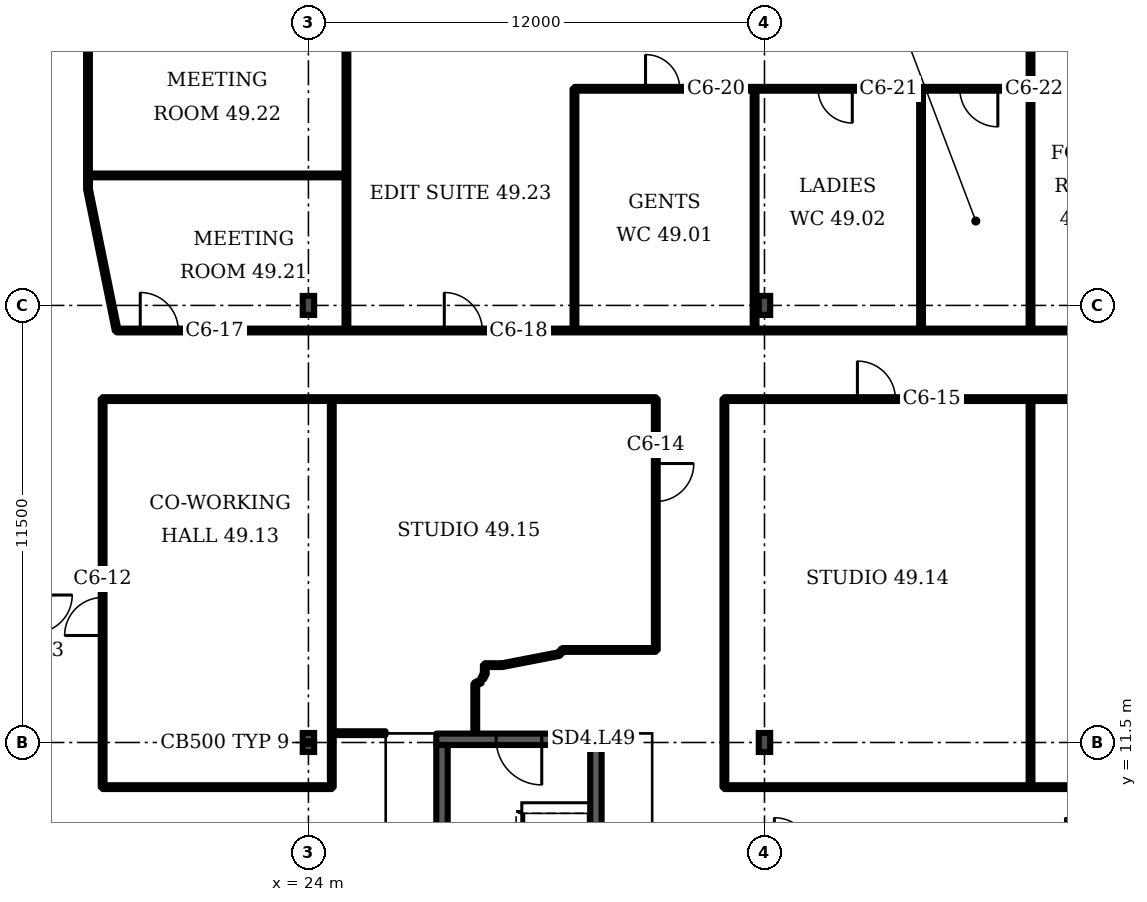
"""IFC4 building model, lengths in metres.
Left out: names, types, materials, properties, quantities, classifications, styles, units other than length and angle.
Written with IfcOpenShell. Run it as: python <this file> out.ifc"""

import sys

from ifc_helpers import new_model, si_unit, direction, frame, frame_2d, origin, origin_2d, place, context, subcontext, project, spatial, rectangle, i_section, extrude, element, fill, save


model = new_model("IFC4")
c1 = context("Model", 3, precision=1e-05, world=origin(), true_north=direction((0.0, 1.0)))
c2 = subcontext(c1, "Body", "Model", "MODEL_VIEW")
j1 = project(units=[si_unit("LENGTHUNIT", "METRE"), si_unit("PLANEANGLEUNIT", "RADIAN")], contexts=[c1])
p1 = place(None, origin())
s1 = spatial("IfcSite", under=j1, at=p1, CompositionType="ELEMENT")
p2 = place(p1, origin())
s2 = spatial("IfcBuilding", under=s1, at=p2, CompositionType="ELEMENT")
p3 = place(p2, frame((0.0, 0.0, 198.7)))
s3 = spatial("IfcBuildingStorey", under=s2, at=p3, CompositionType="ELEMENT", Elevation=198.7)
for number, where, z_axis, x_axis in (
    (1, (24.0, 11.5, 0.0), (0.0, 0.0, 1.0), (1.0, 0.0, 0.0)),
    (2, (36.0, 11.5, 0.0), (0.0, 0.0, 1.0), (1.0, 0.0, 0.0)),
    (3, (24.0, 23.0, 0.0), (0.0, 0.0, 1.0), (1.0, 0.0, 0.0)),
    (4, (36.0, 23.0, 0.0), (0.0, 0.0, 1.0), (1.0, 0.0, 0.0)),
):
    element("IfcColumn", number, at=place(p3, frame(where, z_axis=z_axis, x_axis=x_axis)), inside=s3, PredefinedType="COLUMN", context=c2, shape_type="SweptSolid", body=[
        extrude(i_section(OverallWidth=0.3, OverallDepth=0.5, WebThickness=0.014, FlangeThickness=0.028, FilletRadius=0.027, at=origin_2d()), origin(), (0.0, 0.0, 1.0), 3.6),
    ])
p4 = place(p3, frame((27.364, 11.584, 0.0), z_axis=(0.0, 0.0, 1.0), x_axis=(1.0, 0.0, 0.0)))
e5 = element("IfcWall", 5, at=p4, inside=s3, PredefinedType="SHEAR", context=c2, shape_type="SweptSolid", body=[
    extrude(rectangle(XDim=4.35, YDim=0.3, at=frame_2d((2.175, 0.0))), origin(), (0.0, 0.0, 1.0), 3.15),
])
p5 = place(p4, frame((1.575, 0.0, 0.0)))
e6 = element("IfcOpeningElement", 6, at=p5, cuts=e5, PredefinedType="OPENING", context=c2, shape_type="SweptSolid", body=[
    extrude(rectangle(XDim=1.2, YDim=2.1, at=frame_2d((0.6, 1.05))), frame((0.0, 0.16, 0.0), z_axis=(0.0, -1.0, 0.0), x_axis=(1.0, 0.0, 0.0)), (0.0, 0.0, 1.0), 0.32),
])
p6 = place(p3, frame((18.2, 26.06, 0.0), z_axis=(0.0, 0.0, 1.0), x_axis=(0.0, 1.0, 0.0)))
e7 = element("IfcWall", 7, at=p6, inside=s3, PredefinedType="PARTITIONING", context=c2, shape_type="SweptSolid", body=[
    extrude(rectangle(XDim=4.44, YDim=0.1, at=frame_2d((2.22, 0.0))), origin(), (0.0, 0.0, 1.0), 3.15),
])
p7 = place(p3, frame((18.2, 26.42, 0.0), z_axis=(0.0, 0.0, 1.0), x_axis=(1.0, 0.0, 0.0)))
e8 = element("IfcWall", 8, at=p7, inside=s3, PredefinedType="PARTITIONING", context=c2, shape_type="SweptSolid", body=[
    extrude(rectangle(XDim=6.8, YDim=0.1, at=frame_2d((3.4, 0.0))), origin(), (0.0, 0.0, 1.0), 3.15),
])
p8 = place(p3, frame((18.585, 10.325, 0.0), z_axis=(0.0, 0.0, 1.0), x_axis=(0.0, 1.0, 0.0)))
e9 = element("IfcWall", 9, at=p8, inside=s3, PredefinedType="PARTITIONING", context=c2, shape_type="SweptSolid", body=[
    extrude(rectangle(XDim=10.21, YDim=0.1, at=frame_2d((5.105, 0.0))), origin(), (0.0, 0.0, 1.0), 3.15),
])
p9 = place(p8, frame((3.99, 0.0, 0.0)))
e10 = element("IfcOpeningElement", 10, at=p9, cuts=e9, PredefinedType="OPENING", context=c2, shape_type="SweptSolid", body=[
    extrude(rectangle(XDim=1.0, YDim=2.1, at=frame_2d((0.5, 1.05))), frame((0.0, 0.06, 0.0), z_axis=(0.0, -1.0, 0.0), x_axis=(1.0, 0.0, 0.0)), (0.0, 0.0, 1.0), 0.12),
])
p10 = place(p3, frame((18.585, 10.325, 0.0), z_axis=(0.0, 0.0, 1.0), x_axis=(1.0, 0.0, 0.0)))
e11 = element("IfcWall", 11, at=p10, inside=s3, PredefinedType="PARTITIONING", context=c2, shape_type="SweptSolid", body=[
    extrude(rectangle(XDim=6.03, YDim=0.1, at=frame_2d((3.015, 0.0))), origin(), (0.0, 0.0, 1.0), 3.15),
])
p11 = place(p3, frame((18.585, 20.535, 0.0), z_axis=(0.0, 0.0, 1.0), x_axis=(1.0, 0.0, 0.0)))
e12 = element("IfcWall", 12, at=p11, inside=s3, PredefinedType="PARTITIONING", context=c2, shape_type="SweptSolid", body=[
    extrude(rectangle(XDim=14.555, YDim=0.1, at=frame_2d((7.277, 0.0))), origin(), (0.0, 0.0, 1.0), 3.15),
])
p12 = place(p3, frame((18.955, 22.34, 0.0), z_axis=(0.0, 0.0, 1.0), x_axis=(-0.198935, 0.980011, 0.0)))
e13 = element("IfcWall", 13, at=p12, inside=s3, PredefinedType="PARTITIONING", context=c2, shape_type="SweptSolid", body=[
    extrude(rectangle(XDim=3.796, YDim=0.1, at=frame_2d((1.898, 0.0))), origin(), (0.0, 0.0, 1.0), 3.15),
])
p13 = place(p3, frame((18.955, 22.34, 0.0), z_axis=(0.0, 0.0, 1.0), x_axis=(1.0, 0.0, 0.0)))
e14 = element("IfcWall", 14, at=p13, inside=s3, PredefinedType="PARTITIONING", context=c2, shape_type="SweptSolid", body=[
    extrude(rectangle(XDim=42.555, YDim=0.1, at=frame_2d((21.277, 0.0))), origin(), (0.0, 0.0, 1.0), 3.15),
])
p14 = place(p13, frame((0.62, 0.0, 0.0)))
e15 = element("IfcOpeningElement", 15, at=p14, cuts=e14, PredefinedType="OPENING", context=c2, shape_type="SweptSolid", body=[
    extrude(rectangle(XDim=1.0, YDim=2.1, at=frame_2d((0.5, 1.05))), frame((0.0, 0.06, 0.0), z_axis=(0.0, -1.0, 0.0), x_axis=(1.0, 0.0, 0.0)), (0.0, 0.0, 1.0), 0.12),
])
p15 = place(p13, frame((8.62, 0.0, 0.0)))
e16 = element("IfcOpeningElement", 16, at=p15, cuts=e14, PredefinedType="OPENING", context=c2, shape_type="SweptSolid", body=[
    extrude(rectangle(XDim=1.0, YDim=2.1, at=frame_2d((0.5, 1.05))), frame((0.0, 0.06, 0.0), z_axis=(0.0, -1.0, 0.0), x_axis=(1.0, 0.0, 0.0)), (0.0, 0.0, 1.0), 0.12),
])
p16 = place(p3, frame((24.615, 10.325, 0.0), z_axis=(0.0, 0.0, 1.0), x_axis=(0.0, 1.0, 0.0)))
e17 = element("IfcWall", 17, at=p16, inside=s3, PredefinedType="PARTITIONING", context=c2, shape_type="SweptSolid", body=[
    extrude(rectangle(XDim=10.21, YDim=0.1, at=frame_2d((5.105, 0.0))), origin(), (0.0, 0.0, 1.0), 3.15),
])
p17 = place(p3, frame((24.62, 11.745, 0.0), z_axis=(0.0, 0.0, 1.0), x_axis=(1.0, 0.0, 0.0)))
e18 = element("IfcWall", 18, at=p17, inside=s3, PredefinedType="PARTITIONING", context=c2, shape_type="SweptSolid", body=[
    extrude(rectangle(XDim=1.407, YDim=0.1, at=frame_2d((0.703, 0.0))), origin(), (0.0, 0.0, 1.0), 3.15),
])
p18 = place(p3, frame((25.0, 22.34, 0.0), z_axis=(0.0, 0.0, 1.0), x_axis=(0.0, 1.0, 0.0)))
e19 = element("IfcWall", 19, at=p18, inside=s3, PredefinedType="PARTITIONING", context=c2, shape_type="SweptSolid", body=[
    extrude(rectangle(XDim=8.16, YDim=0.1, at=frame_2d((4.08, 0.0))), origin(), (0.0, 0.0, 1.0), 3.15),
])
p19 = place(p3, frame((28.39, 13.035, 0.0), z_axis=(0.0, 0.0, 1.0), x_axis=(0.900411, 0.435047, 0.0)))
e20 = element("IfcWall", 20, at=p19, inside=s3, PredefinedType="PARTITIONING", context=c2, shape_type="SweptSolid", body=[
    extrude(rectangle(XDim=0.161, YDim=0.1, at=frame_2d((0.081, 0.0))), origin(), (0.0, 0.0, 1.0), 3.15),
])
p20 = place(p3, frame((28.39, 11.754, 0.0), z_axis=(0.0, 0.0, 1.0), x_axis=(0.0, 1.0, 0.0)))
e21 = element("IfcWall", 21, at=p20, inside=s3, PredefinedType="PARTITIONING", context=c2, shape_type="SweptSolid", body=[
    extrude(rectangle(XDim=1.281, YDim=0.1, at=frame_2d((0.64, 0.0))), origin(), (0.0, 0.0, 1.0), 3.15),
])
p21 = place(p3, frame((28.575, 13.185, 0.0), z_axis=(0.0, 0.0, 1.0), x_axis=(0.461027, 0.88739, 0.0)))
e22 = element("IfcWall", 22, at=p21, inside=s3, PredefinedType="PARTITIONING", context=c2, shape_type="SweptSolid", body=[
    extrude(rectangle(XDim=0.141, YDim=0.1, at=frame_2d((0.07, 0.0))), origin(), (0.0, 0.0, 1.0), 3.15),
])
p22 = place(p3, frame((28.64, 13.31, 0.0), z_axis=(0.0, 0.0, 1.0), x_axis=(0.0, 1.0, 0.0)))
e23 = element("IfcWall", 23, at=p22, inside=s3, PredefinedType="PARTITIONING", context=c2, shape_type="SweptSolid", body=[
    extrude(rectangle(XDim=0.225, YDim=0.1, at=frame_2d((0.112, 0.0))), origin(), (0.0, 0.0, 1.0), 3.15),
])
p23 = place(p3, frame((28.64, 13.535, 0.0), z_axis=(0.0, 0.0, 1.0), x_axis=(1.0, 0.0, 0.0)))
e24 = element("IfcWall", 24, at=p23, inside=s3, PredefinedType="PARTITIONING", context=c2, shape_type="SweptSolid", body=[
    extrude(rectangle(XDim=0.46, YDim=0.1, at=frame_2d((0.23, 0.0))), origin(), (0.0, 0.0, 1.0), 3.15),
])
p24 = place(p3, frame((29.1, 13.535, 0.0), z_axis=(0.0, 0.0, 1.0), x_axis=(0.981576, 0.191072, 0.0)))
e25 = element("IfcWall", 25, at=p24, inside=s3, PredefinedType="PARTITIONING", context=c2, shape_type="SweptSolid", body=[
    extrude(rectangle(XDim=1.518, YDim=0.1, at=frame_2d((0.759, 0.0))), origin(), (0.0, 0.0, 1.0), 3.15),
])
p25 = place(p3, frame((30.59, 13.825, 0.0), z_axis=(0.0, 0.0, 1.0), x_axis=(0.671773, 0.740757, 0.0)))
e26 = element("IfcWall", 26, at=p25, inside=s3, PredefinedType="PARTITIONING", context=c2, shape_type="SweptSolid", body=[
    extrude(rectangle(XDim=0.149, YDim=0.1, at=frame_2d((0.074, 0.0))), origin(), (0.0, 0.0, 1.0), 3.15),
])
p26 = place(p3, frame((30.69, 13.935, 0.0), z_axis=(0.0, 0.0, 1.0), x_axis=(1.0, 0.0, 0.0)))
e27 = element("IfcWall", 27, at=p26, inside=s3, PredefinedType="PARTITIONING", context=c2, shape_type="SweptSolid", body=[
    extrude(rectangle(XDim=2.45, YDim=0.1, at=frame_2d((1.225, 0.0))), origin(), (0.0, 0.0, 1.0), 3.15),
])
p27 = place(p3, frame((31.0, 22.34, 0.0), z_axis=(0.0, 0.0, 1.0), x_axis=(0.0, 1.0, 0.0)))
e28 = element("IfcWall", 28, at=p27, inside=s3, PredefinedType="PARTITIONING", context=c2, shape_type="SweptSolid", body=[
    extrude(rectangle(XDim=6.36, YDim=0.1, at=frame_2d((3.18, 0.0))), origin(), (0.0, 0.0, 1.0), 3.15),
])
p28 = place(p3, frame((31.0, 28.7, 0.0), z_axis=(0.0, 0.0, 1.0), x_axis=(1.0, 0.0, 0.0)))
e29 = element("IfcWall", 29, at=p28, inside=s3, PredefinedType="PARTITIONING", context=c2, shape_type="SweptSolid", body=[
    extrude(rectangle(XDim=12.0, YDim=0.1, at=frame_2d((6.0, 0.0))), origin(), (0.0, 0.0, 1.0), 3.15),
])
p29 = place(p28, frame((1.87, 0.0, 0.0)))
e30 = element("IfcOpeningElement", 30, at=p29, cuts=e29, PredefinedType="OPENING", context=c2, shape_type="SweptSolid", body=[
    extrude(rectangle(XDim=0.9, YDim=2.1, at=frame_2d((0.45, 1.05))), frame((0.0, 0.06, 0.0), z_axis=(0.0, -1.0, 0.0), x_axis=(1.0, 0.0, 0.0)), (0.0, 0.0, 1.0), 0.12),
])
p30 = place(p28, frame((6.41, 0.0, 0.0)))
e31 = element("IfcOpeningElement", 31, at=p30, cuts=e29, PredefinedType="OPENING", context=c2, shape_type="SweptSolid", body=[
    extrude(rectangle(XDim=0.9, YDim=2.1, at=frame_2d((0.45, 1.05))), frame((0.0, 0.06, 0.0), z_axis=(0.0, -1.0, 0.0), x_axis=(1.0, 0.0, 0.0)), (0.0, 0.0, 1.0), 0.12),
])
p31 = place(p28, frame((10.14, 0.0, 0.0)))
e32 = element("IfcOpeningElement", 32, at=p31, cuts=e29, PredefinedType="OPENING", context=c2, shape_type="SweptSolid", body=[
    extrude(rectangle(XDim=1.0, YDim=2.1, at=frame_2d((0.5, 1.05))), frame((0.0, 0.06, 0.0), z_axis=(0.0, -1.0, 0.0), x_axis=(1.0, 0.0, 0.0)), (0.0, 0.0, 1.0), 0.12),
])
p32 = place(p3, frame((33.14, 13.935, 0.0), z_axis=(0.0, 0.0, 1.0), x_axis=(0.0, 1.0, 0.0)))
e33 = element("IfcWall", 33, at=p32, inside=s3, PredefinedType="PARTITIONING", context=c2, shape_type="SweptSolid", body=[
    extrude(rectangle(XDim=6.6, YDim=0.1, at=frame_2d((3.3, 0.0))), origin(), (0.0, 0.0, 1.0), 3.15),
])
p33 = place(p32, frame((3.905, 0.0, 0.0)))
e34 = element("IfcOpeningElement", 34, at=p33, cuts=e33, PredefinedType="OPENING", context=c2, shape_type="SweptSolid", body=[
    extrude(rectangle(XDim=1.0, YDim=2.1, at=frame_2d((0.5, 1.05))), frame((0.0, 0.06, 0.0), z_axis=(0.0, -1.0, 0.0), x_axis=(1.0, 0.0, 0.0)), (0.0, 0.0, 1.0), 0.12),
])
p34 = place(p3, frame((34.945, 10.325, 0.0), z_axis=(0.0, 0.0, 1.0), x_axis=(0.0, 1.0, 0.0)))
e35 = element("IfcWall", 35, at=p34, inside=s3, PredefinedType="PARTITIONING", context=c2, shape_type="SweptSolid", body=[
    extrude(rectangle(XDim=10.21, YDim=0.1, at=frame_2d((5.105, 0.0))), origin(), (0.0, 0.0, 1.0), 3.15),
])
p35 = place(p3, frame((34.945, 10.325, 0.0), z_axis=(0.0, 0.0, 1.0), x_axis=(1.0, 0.0, 0.0)))
e36 = element("IfcWall", 36, at=p35, inside=s3, PredefinedType="PARTITIONING", context=c2, shape_type="SweptSolid", body=[
    extrude(rectangle(XDim=28.841, YDim=0.1, at=frame_2d((14.421, 0.0))), origin(), (0.0, 0.0, 1.0), 3.15),
])
p36 = place(p35, frame((22.995, 0.0, 0.0)))
e37 = element("IfcOpeningElement", 37, at=p36, cuts=e36, PredefinedType="OPENING", context=c2, shape_type="SweptSolid", body=[
    extrude(rectangle(XDim=1.0, YDim=2.1, at=frame_2d((0.5, 1.05))), frame((0.0, 0.06, 0.0), z_axis=(0.0, -1.0, 0.0), x_axis=(1.0, 0.0, 0.0)), (0.0, 0.0, 1.0), 0.12),
])
p37 = place(p3, frame((34.945, 20.535, 0.0), z_axis=(0.0, 0.0, 1.0), x_axis=(1.0, 0.0, 0.0)))
e38 = element("IfcWall", 38, at=p37, inside=s3, PredefinedType="PARTITIONING", context=c2, shape_type="SweptSolid", body=[
    extrude(rectangle(XDim=25.945, YDim=0.1, at=frame_2d((12.972, 0.0))), origin(), (0.0, 0.0, 1.0), 3.15),
])
p38 = place(p37, frame((3.5, 0.0, 0.0)))
e39 = element("IfcOpeningElement", 39, at=p38, cuts=e38, PredefinedType="OPENING", context=c2, shape_type="SweptSolid", body=[
    extrude(rectangle(XDim=1.0, YDim=2.1, at=frame_2d((0.5, 1.05))), frame((0.0, 0.06, 0.0), z_axis=(0.0, -1.0, 0.0), x_axis=(1.0, 0.0, 0.0)), (0.0, 0.0, 1.0), 0.12),
])
p39 = place(p37, frame((13.075, 0.0, 0.0)))
e40 = element("IfcOpeningElement", 40, at=p39, cuts=e38, PredefinedType="OPENING", context=c2, shape_type="SweptSolid", body=[
    extrude(rectangle(XDim=1.8, YDim=2.1, at=frame_2d((0.9, 1.05))), frame((0.0, 0.06, 0.0), z_axis=(0.0, -1.0, 0.0), x_axis=(1.0, 0.0, 0.0)), (0.0, 0.0, 1.0), 0.12),
])
for number, where, z_axis, x_axis in (
    (41, (35.74, 22.34, 0.0), (0.0, 0.0, 1.0), (0.0, 1.0, 0.0)),
    (42, (40.12, 22.34, 0.0), (0.0, 0.0, 1.0), (0.0, 1.0, 0.0)),
):
    element("IfcWall", number, at=place(p3, frame(where, z_axis=z_axis, x_axis=x_axis)), inside=s3, PredefinedType="PARTITIONING", context=c2, shape_type="SweptSolid", body=[
        extrude(rectangle(XDim=6.36, YDim=0.1, at=frame_2d((3.18, 0.0))), origin(), (0.0, 0.0, 1.0), 3.15),
    ])
p40 = place(p3, frame((43.0, 10.33, 0.0), z_axis=(0.0, 0.0, 1.0), x_axis=(0.0, 1.0, 0.0)))
e43 = element("IfcWall", 43, at=p40, inside=s3, PredefinedType="PARTITIONING", context=c2, shape_type="SweptSolid", body=[
    extrude(rectangle(XDim=10.205, YDim=0.1, at=frame_2d((5.103, 0.0))), origin(), (0.0, 0.0, 1.0), 3.15),
])
p41 = place(p3, frame((43.0, 22.34, 0.0), z_axis=(0.0, 0.0, 1.0), x_axis=(0.0, 1.0, 0.0)))
e44 = element("IfcWall", 44, at=p41, inside=s3, PredefinedType="PARTITIONING", context=c2, shape_type="SweptSolid", body=[
    extrude(rectangle(XDim=8.15, YDim=0.1, at=frame_2d((4.075, 0.0))), origin(), (0.0, 0.0, 1.0), 3.15),
])
for number, where, z_axis, x_axis in (
    (45, (27.514, 3.934, 0.0), (0.0, 0.0, 1.0), (0.0, 1.0, 0.0)),
    (46, (31.564, 3.934, 0.0), (0.0, 0.0, 1.0), (0.0, 1.0, 0.0)),
):
    element("IfcWall", number, at=place(p3, frame(where, z_axis=z_axis, x_axis=x_axis)), inside=s3, PredefinedType="SHEAR", context=c2, shape_type="SweptSolid", body=[
        extrude(rectangle(XDim=7.5, YDim=0.3, at=frame_2d((3.75, 0.0))), origin(), (0.0, 0.0, 1.0), 3.15),
    ])
p42 = place(p5, origin())
e47 = element("IfcDoor", 47, at=p42, inside=s3, OperationType="SINGLE_SWING_RIGHT", PredefinedType="DOOR", context=c2, shape_type="SweptSolid", body=[
    extrude(rectangle(XDim=1.2, YDim=2.1, at=frame_2d((0.6, 1.05))), frame((0.0, 0.025, 0.0), z_axis=(0.0, -1.0, 0.0), x_axis=(1.0, 0.0, 0.0)), (0.0, 0.0, 1.0), 0.05),
])
fill(e6, e47)
p43 = place(p9, origin())
e48 = element("IfcDoor", 48, at=p43, inside=s3, OperationType="SINGLE_SWING_LEFT", PredefinedType="DOOR", context=c2, shape_type="SweptSolid", body=[
    extrude(rectangle(XDim=1.0, YDim=2.1, at=frame_2d((0.5, 1.05))), frame((0.0, 0.025, 0.0), z_axis=(0.0, -1.0, 0.0), x_axis=(1.0, 0.0, 0.0)), (0.0, 0.0, 1.0), 0.05),
])
fill(e10, e48)
p44 = place(p33, origin())
e49 = element("IfcDoor", 49, at=p44, inside=s3, OperationType="SINGLE_SWING_RIGHT", PredefinedType="DOOR", context=c2, shape_type="SweptSolid", body=[
    extrude(rectangle(XDim=1.0, YDim=2.1, at=frame_2d((0.5, 1.05))), frame((0.0, 0.025, 0.0), z_axis=(0.0, -1.0, 0.0), x_axis=(1.0, 0.0, 0.0)), (0.0, 0.0, 1.0), 0.05),
])
fill(e34, e49)
p45 = place(p38, origin())
e50 = element("IfcDoor", 50, at=p45, inside=s3, OperationType="SINGLE_SWING_LEFT", PredefinedType="DOOR", context=c2, shape_type="SweptSolid", body=[
    extrude(rectangle(XDim=1.0, YDim=2.1, at=frame_2d((0.5, 1.05))), frame((0.0, 0.025, 0.0), z_axis=(0.0, -1.0, 0.0), x_axis=(1.0, 0.0, 0.0)), (0.0, 0.0, 1.0), 0.05),
])
fill(e39, e50)
p46 = place(p14, origin())
e51 = element("IfcDoor", 51, at=p46, inside=s3, OperationType="SINGLE_SWING_LEFT", PredefinedType="DOOR", context=c2, shape_type="SweptSolid", body=[
    extrude(rectangle(XDim=1.0, YDim=2.1, at=frame_2d((0.5, 1.05))), frame((0.0, 0.025, 0.0), z_axis=(0.0, -1.0, 0.0), x_axis=(1.0, 0.0, 0.0)), (0.0, 0.0, 1.0), 0.05),
])
fill(e15, e51)
p47 = place(p15, origin())
e52 = element("IfcDoor", 52, at=p47, inside=s3, OperationType="SINGLE_SWING_LEFT", PredefinedType="DOOR", context=c2, shape_type="SweptSolid", body=[
    extrude(rectangle(XDim=1.0, YDim=2.1, at=frame_2d((0.5, 1.05))), frame((0.0, 0.025, 0.0), z_axis=(0.0, -1.0, 0.0), x_axis=(1.0, 0.0, 0.0)), (0.0, 0.0, 1.0), 0.05),
])
fill(e16, e52)
p48 = place(p29, origin())
e53 = element("IfcDoor", 53, at=p48, inside=s3, OperationType="SINGLE_SWING_LEFT", PredefinedType="DOOR", context=c2, shape_type="SweptSolid", body=[
    extrude(rectangle(XDim=0.9, YDim=2.1, at=frame_2d((0.45, 1.05))), frame((0.0, 0.025, 0.0), z_axis=(0.0, -1.0, 0.0), x_axis=(1.0, 0.0, 0.0)), (0.0, 0.0, 1.0), 0.05),
])
fill(e30, e53)
p49 = place(p30, origin())
e54 = element("IfcDoor", 54, at=p49, inside=s3, OperationType="SINGLE_SWING_RIGHT", PredefinedType="DOOR", context=c2, shape_type="SweptSolid", body=[
    extrude(rectangle(XDim=0.9, YDim=2.1, at=frame_2d((0.45, 1.05))), frame((0.0, 0.025, 0.0), z_axis=(0.0, -1.0, 0.0), x_axis=(1.0, 0.0, 0.0)), (0.0, 0.0, 1.0), 0.05),
])
fill(e31, e54)
p50 = place(p31, origin())
e55 = element("IfcDoor", 55, at=p50, inside=s3, OperationType="SINGLE_SWING_RIGHT", PredefinedType="DOOR", context=c2, shape_type="SweptSolid", body=[
    extrude(rectangle(XDim=1.0, YDim=2.1, at=frame_2d((0.5, 1.05))), frame((0.0, 0.025, 0.0), z_axis=(0.0, -1.0, 0.0), x_axis=(1.0, 0.0, 0.0)), (0.0, 0.0, 1.0), 0.05),
])
fill(e32, e55)
save(model, sys.argv[1])
